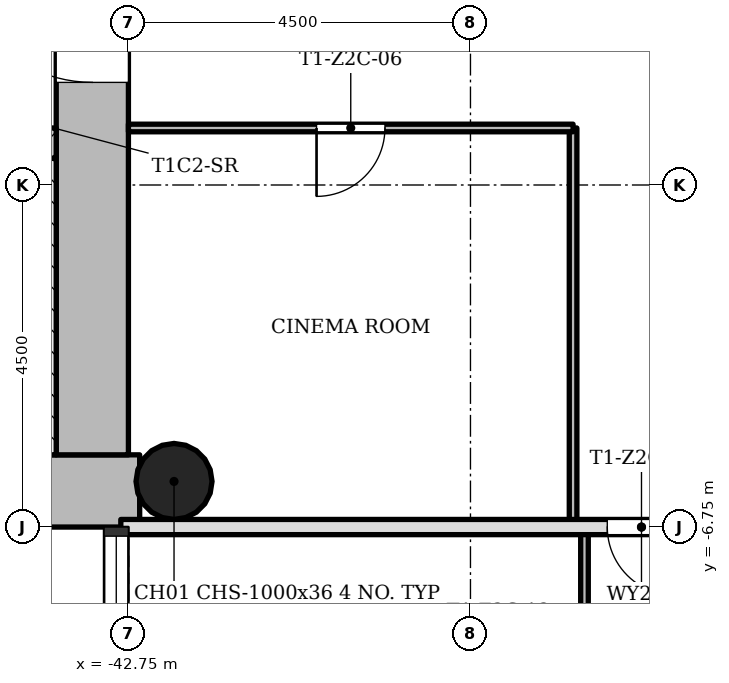
"""IFC4 building model, lengths in metres.
Left out: names, types, materials, properties, quantities, classifications, styles, units other than length and angle.
Written with IfcOpenShell. Run it as: python <this file> out.ifc"""

import sys

from ifc_helpers import new_model, si_unit, direction, frame, frame_2d, origin, origin_2d, place, context, subcontext, project, spatial, rectangle, hollow_circle, extrude, element, fill, save


model = new_model("IFC4")
c1 = context("Model", 3, precision=1e-05, world=origin(), true_north=direction((0.0, 1.0)))
c2 = subcontext(c1, "Body", "Model", "MODEL_VIEW")
j1 = project(units=[si_unit("LENGTHUNIT", "METRE"), si_unit("PLANEANGLEUNIT", "RADIAN")], contexts=[c1])
p1 = place(None, origin())
s1 = spatial("IfcSite", under=j1, at=p1, CompositionType="ELEMENT")
p2 = place(p1, origin())
s2 = spatial("IfcBuilding", under=s1, at=p2, CompositionType="ELEMENT")
p3 = place(p2, frame((0.0, 0.0, 90.2)))
s3 = spatial("IfcBuildingStorey", under=s2, at=p3, CompositionType="ELEMENT", Elevation=90.2)
p4 = place(p3, frame((-51.298, -6.275, 0.0), z_axis=(0.0, 0.0, 1.0), x_axis=(1.0, 0.0, 0.0)))
e1 = element("IfcWall", 1, at=p4, inside=s3, PredefinedType="SHEAR", context=c2, shape_type="SweptSolid", body=[
    extrude(rectangle(XDim=8.696, YDim=0.95, at=frame_2d((4.348, 0.0))), origin(), (0.0, 0.0, 1.0), 3.4),
])
p5 = place(p3, frame((-43.225, -5.8, 0.0), z_axis=(0.0, 0.0, 1.0), x_axis=(0.0, 1.0, 0.0)))
e2 = element("IfcWall", 2, at=p5, inside=s3, PredefinedType="SHEAR", context=c2, shape_type="SweptSolid", body=[
    extrude(rectangle(XDim=12.55, YDim=0.95, at=frame_2d((6.275, 0.0))), origin(), (0.0, 0.0, 1.0), 3.4),
])
p6 = place(p5, frame((4.9, 0.0, 0.0)))
e3 = element("IfcOpeningElement", 3, at=p6, cuts=e2, PredefinedType="OPENING", context=c2, shape_type="SweptSolid", body=[
    extrude(rectangle(XDim=1.8, YDim=2.1, at=frame_2d((0.9, 1.05))), frame((0.0, 0.485, 0.0), z_axis=(0.0, -1.0, 0.0), x_axis=(1.0, 0.0, 0.0)), (0.0, 0.0, 1.0), 0.97),
])
p7 = place(p3, frame((-50.8, -1.7, 0.0), z_axis=(0.0, 0.0, 1.0), x_axis=(1.0, 0.0, 0.0)))
e4 = element("IfcWall", 4, at=p7, inside=s3, PredefinedType="SHEAR", context=c2, shape_type="SweptSolid", body=[
    extrude(rectangle(XDim=7.1, YDim=0.4, at=frame_2d((3.55, 0.0))), origin(), (0.0, 0.0, 1.0), 3.4),
])
p8 = place(p7, frame((5.5, 0.0, 0.0)))
e5 = element("IfcOpeningElement", 5, at=p8, cuts=e4, PredefinedType="OPENING", context=c2, shape_type="SweptSolid", body=[
    extrude(rectangle(XDim=0.9, YDim=2.1, at=frame_2d((0.45, 1.05))), frame((0.0, 0.21, 0.0), z_axis=(0.0, -1.0, 0.0), x_axis=(1.0, 0.0, 0.0)), (0.0, 0.0, 1.0), 0.42),
])
p9 = place(p3, frame((-42.15, -6.15, 0.0), z_axis=(0.0, 0.0, 1.0), x_axis=(1.0, 0.0, 0.0)))
e6 = element("IfcColumn", 6, at=p9, inside=s3, PredefinedType="COLUMN", context=c2, shape_type="SweptSolid", body=[
    extrude(hollow_circle(Radius=0.5, WallThickness=0.036, at=origin_2d()), origin(), (0.0, 0.0, 1.0), 3.4),
])
p10 = place(p3, frame((-36.9, -6.75, 0.0), z_axis=(0.0, 0.0, 1.0), x_axis=(0.0, 1.0, 0.0)))
e7 = element("IfcWall", 7, at=p10, inside=s3, PredefinedType="PARTITIONING", context=c2, shape_type="SweptSolid", body=[
    extrude(rectangle(XDim=5.25, YDim=0.1, at=frame_2d((2.625, 0.0))), origin(), (0.0, 0.0, 1.0), 3.0),
])
p11 = place(p3, frame((-36.75, -14.55, 0.0), z_axis=(0.0, 0.0, 1.0), x_axis=(0.0, 1.0, 0.0)))
e8 = element("IfcWall", 8, at=p11, inside=s3, PredefinedType="PARTITIONING", context=c2, shape_type="SweptSolid", body=[
    extrude(rectangle(XDim=7.8, YDim=0.1, at=frame_2d((3.9, 0.0))), origin(), (0.0, 0.0, 1.0), 3.0),
])
p12 = place(p11, frame((5.1, 0.0, 0.0)))
e9 = element("IfcOpeningElement", 9, at=p12, cuts=e8, PredefinedType="OPENING", context=c2, shape_type="SweptSolid", body=[
    extrude(rectangle(XDim=0.9, YDim=2.1, at=frame_2d((0.45, 1.05))), frame((0.0, 0.06, 0.0), z_axis=(0.0, -1.0, 0.0), x_axis=(1.0, 0.0, 0.0)), (0.0, 0.0, 1.0), 0.12),
])
p13 = place(p11, frame((1.95, 0.0, 0.0)))
e10 = element("IfcOpeningElement", 10, at=p13, cuts=e8, PredefinedType="OPENING", context=c2, shape_type="SweptSolid", body=[
    extrude(rectangle(XDim=0.9, YDim=2.1, at=frame_2d((0.45, 1.05))), frame((0.0, 0.06, 0.0), z_axis=(0.0, -1.0, 0.0), x_axis=(1.0, 0.0, 0.0)), (0.0, 0.0, 1.0), 0.12),
])
p14 = place(p11, frame((0.3, 0.0, 0.0)))
e11 = element("IfcOpeningElement", 11, at=p14, cuts=e8, PredefinedType="OPENING", context=c2, shape_type="SweptSolid", body=[
    extrude(rectangle(XDim=0.9, YDim=2.1, at=frame_2d((0.45, 1.05))), frame((0.0, 0.06, 0.0), z_axis=(0.0, -1.0, 0.0), x_axis=(1.0, 0.0, 0.0)), (0.0, 0.0, 1.0), 0.12),
])
p15 = place(p3, frame((-42.85, -6.75, 0.0), z_axis=(0.0, 0.0, 1.0), x_axis=(1.0, 0.0, 0.0)))
e12 = element("IfcWall", 12, at=p15, inside=s3, PredefinedType="SOLIDWALL", context=c2, shape_type="SweptSolid", body=[
    extrude(rectangle(XDim=13.7, YDim=0.2, at=frame_2d((6.85, 0.0))), origin(), (0.0, 0.0, 1.0), 3.0),
])
p16 = place(p15, frame((6.4, 0.0, 0.0)))
e13 = element("IfcOpeningElement", 13, at=p16, cuts=e12, PredefinedType="OPENING", context=c2, shape_type="SweptSolid", body=[
    extrude(rectangle(XDim=0.9, YDim=2.1, at=frame_2d((0.45, 1.05))), frame((0.0, 0.11, 0.0), z_axis=(0.0, -1.0, 0.0), x_axis=(1.0, 0.0, 0.0)), (0.0, 0.0, 1.0), 0.22),
])
p17 = place(p3, frame((-42.75, -1.5, 0.0), z_axis=(0.0, 0.0, 1.0), x_axis=(1.0, 0.0, 0.0)))
e14 = element("IfcWall", 14, at=p17, inside=s3, PredefinedType="PARTITIONING", context=c2, shape_type="SweptSolid", body=[
    extrude(rectangle(XDim=5.85, YDim=0.1, at=frame_2d((2.925, 0.0))), origin(), (0.0, 0.0, 1.0), 3.0),
])
p18 = place(p17, frame((2.475, 0.0, 0.0)))
e15 = element("IfcOpeningElement", 15, at=p18, cuts=e14, PredefinedType="OPENING", context=c2, shape_type="SweptSolid", body=[
    extrude(rectangle(XDim=0.9, YDim=2.1, at=frame_2d((0.45, 1.05))), frame((0.0, 0.06, 0.0), z_axis=(0.0, -1.0, 0.0), x_axis=(1.0, 0.0, 0.0)), (0.0, 0.0, 1.0), 0.12),
])
p19 = place(p3, frame((-43.825, -1.9, 0.0), z_axis=(0.0, 0.0, 1.0), x_axis=(0.0, -1.0, 0.0)))
e16 = element("IfcWall", 16, at=p19, inside=s3, PredefinedType="SHEAR", context=c2, shape_type="SweptSolid", body=[
    extrude(rectangle(XDim=3.9, YDim=0.25, at=frame_2d((1.95, 0.0))), origin(), (0.0, 0.0, 1.0), 3.4),
])
p20 = place(p18, origin())
e17 = element("IfcDoor", 17, at=p20, inside=s3, OperationType="SINGLE_SWING_LEFT", PredefinedType="DOOR", context=c2, shape_type="SweptSolid", body=[
    extrude(rectangle(XDim=0.9, YDim=2.1, at=frame_2d((0.45, 1.05))), frame((0.0, 0.025, 0.0), z_axis=(0.0, -1.0, 0.0), x_axis=(1.0, 0.0, 0.0)), (0.0, 0.0, 1.0), 0.05),
])
fill(e15, e17)
p21 = place(p16, origin())
e18 = element("IfcDoor", 18, at=p21, inside=s3, OperationType="SINGLE_SWING_RIGHT", PredefinedType="DOOR", context=c2, shape_type="SweptSolid", body=[
    extrude(rectangle(XDim=0.9, YDim=2.1, at=frame_2d((0.45, 1.05))), frame((0.0, 0.025, 0.0), z_axis=(0.0, -1.0, 0.0), x_axis=(1.0, 0.0, 0.0)), (0.0, 0.0, 1.0), 0.05),
])
fill(e13, e18)
p22 = place(p6, origin())
e19 = element("IfcDoor", 19, at=p22, inside=s3, OperationType="SINGLE_SWING_LEFT", PredefinedType="DOOR", context=c2, shape_type="SweptSolid", body=[
    extrude(rectangle(XDim=1.8, YDim=2.1, at=frame_2d((0.9, 1.05))), frame((0.0, 0.025, 0.0), z_axis=(0.0, -1.0, 0.0), x_axis=(1.0, 0.0, 0.0)), (0.0, 0.0, 1.0), 0.05),
])
fill(e3, e19)
save(model, sys.argv[1])
